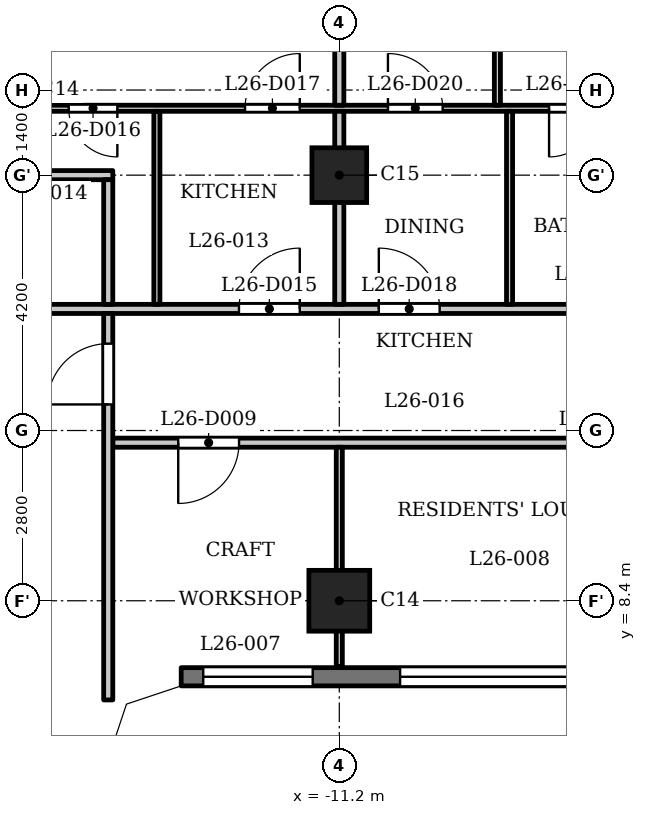
"""IFC4 building model, lengths in metres.
Left out: names, types, materials, properties, quantities, classifications, styles, units other than length and angle.
Written with IfcOpenShell. Run it as: python <this file> out.ifc"""

import sys

from ifc_helpers import new_model, si_unit, direction, frame, frame_2d, origin, origin_2d, place, context, subcontext, project, spatial, polyline, rectangle, outline, extrude, element, fill, save


model = new_model("IFC4")
c1 = context("Model", 3, precision=1e-05, world=origin(), true_north=direction((0.0, 1.0)))
c2 = subcontext(c1, "Body", "Model", "MODEL_VIEW")
j1 = project(units=[si_unit("LENGTHUNIT", "METRE"), si_unit("PLANEANGLEUNIT", "RADIAN")], contexts=[c1])
p1 = place(None, origin())
s1 = spatial("IfcSite", under=j1, at=p1, CompositionType="ELEMENT")
p2 = place(p1, origin())
s2 = spatial("IfcBuilding", under=s1, at=p2, CompositionType="ELEMENT")
p3 = place(p2, frame((0.0, 0.0, 104.3)))
s3 = spatial("IfcBuildingStorey", under=s2, at=p3, CompositionType="ELEMENT", Elevation=104.3)
p4 = place(p3, frame((-11.2, 8.4, 0.0), z_axis=(0.0, 0.0, 1.0), x_axis=(1.0, 0.0, 0.0)))
e1 = element("IfcColumn", 1, at=p4, inside=s3, PredefinedType="COLUMN", context=c2, shape_type="SweptSolid", body=[
    extrude(rectangle(XDim=1.0, YDim=1.0, at=origin_2d()), origin(), (0.0, 0.0, 1.0), 3.5),
])
p5 = place(p3, frame((-11.2, 15.4, 0.0), z_axis=(0.0, 0.0, 1.0), x_axis=(1.0, 0.0, 0.0)))
e2 = element("IfcColumn", 2, at=p5, inside=s3, PredefinedType="COLUMN", context=c2, shape_type="SweptSolid", body=[
    extrude(rectangle(XDim=0.9, YDim=0.9, at=origin_2d()), origin(), (0.0, 0.0, 1.0), 3.5),
])
p6 = place(p3, frame((-13.8, 7.15, 0.0), z_axis=(0.0, 0.0, 1.0), x_axis=(1.0, 0.0, 0.0)))
e3 = element("IfcWall", 3, at=p6, inside=s3, PredefinedType="SOLIDWALL", context=c2, shape_type="SweptSolid", body=[
    extrude(rectangle(XDim=27.6, YDim=0.3, at=frame_2d((13.8, 0.0))), origin(), (0.0, 0.0, 1.0), 3.2),
])
p7 = place(p6, frame((0.363, 0.0, 0.9)))
e4 = element("IfcOpeningElement", 4, at=p7, cuts=e3, PredefinedType="OPENING", context=c2, shape_type="SweptSolid", body=[
    extrude(rectangle(XDim=1.8, YDim=1.25, at=frame_2d((0.9, 0.625))), frame((0.0, 0.16, 0.0), z_axis=(0.0, -1.0, 0.0), x_axis=(1.0, 0.0, 0.0)), (0.0, 0.0, 1.0), 0.32),
])
p8 = place(p6, frame((3.6, 0.0, 1.2)))
e5 = element("IfcOpeningElement", 5, at=p8, cuts=e3, PredefinedType="OPENING", context=c2, shape_type="SweptSolid", body=[
    extrude(rectangle(XDim=3.6, YDim=0.95, at=frame_2d((1.8, 0.475))), frame((0.0, 0.16, 0.0), z_axis=(0.0, -1.0, 0.0), x_axis=(1.0, 0.0, 0.0)), (0.0, 0.0, 1.0), 0.32),
])
p9 = place(p6, frame((9.2, 0.0, 1.2)))
e6 = element("IfcOpeningElement", 6, at=p9, cuts=e3, PredefinedType="OPENING", context=c2, shape_type="SweptSolid", body=[
    extrude(rectangle(XDim=3.6, YDim=0.95, at=frame_2d((1.8, 0.475))), frame((0.0, 0.16, 0.0), z_axis=(0.0, -1.0, 0.0), x_axis=(1.0, 0.0, 0.0)), (0.0, 0.0, 1.0), 0.32),
])
p10 = place(p6, frame((14.8, 0.0, 1.2)))
e7 = element("IfcOpeningElement", 7, at=p10, cuts=e3, PredefinedType="OPENING", context=c2, shape_type="SweptSolid", body=[
    extrude(rectangle(XDim=3.6, YDim=0.95, at=frame_2d((1.8, 0.475))), frame((0.0, 0.16, 0.0), z_axis=(0.0, -1.0, 0.0), x_axis=(1.0, 0.0, 0.0)), (0.0, 0.0, 1.0), 0.32),
])
p11 = place(p6, frame((20.4, 0.0, 1.2)))
e8 = element("IfcOpeningElement", 8, at=p11, cuts=e3, PredefinedType="OPENING", context=c2, shape_type="SweptSolid", body=[
    extrude(rectangle(XDim=3.6, YDim=0.95, at=frame_2d((1.8, 0.475))), frame((0.0, 0.16, 0.0), z_axis=(0.0, -1.0, 0.0), x_axis=(1.0, 0.0, 0.0)), (0.0, 0.0, 1.0), 0.32),
])
p12 = place(p6, frame((25.438, 0.0, 0.9)))
e9 = element("IfcOpeningElement", 9, at=p12, cuts=e3, PredefinedType="OPENING", context=c2, shape_type="SweptSolid", body=[
    extrude(rectangle(XDim=1.8, YDim=1.25, at=frame_2d((0.9, 0.625))), frame((0.0, 0.16, 0.0), z_axis=(0.0, -1.0, 0.0), x_axis=(1.0, 0.0, 0.0)), (0.0, 0.0, 1.0), 0.32),
])
p13 = place(p3, frame((-14.925, 11.0, 0.0), z_axis=(0.0, 0.0, 1.0), x_axis=(1.0, 0.0, 0.0)))
e10 = element("IfcWall", 10, at=p13, inside=s3, PredefinedType="PARTITIONING", context=c2, shape_type="SweptSolid", body=[
    extrude(rectangle(XDim=29.85, YDim=0.15, at=frame_2d((14.925, 0.0))), origin(), (0.0, 0.0, 1.0), 3.2),
])
p14 = place(p13, frame((1.076, 0.0, 0.0)))
e11 = element("IfcOpeningElement", 11, at=p14, cuts=e10, PredefinedType="OPENING", context=c2, shape_type="SweptSolid", body=[
    extrude(rectangle(XDim=1.0, YDim=2.1, at=frame_2d((0.5, 1.05))), frame((0.0, 0.085, 0.0), z_axis=(0.0, -1.0, 0.0), x_axis=(1.0, 0.0, 0.0)), (0.0, 0.0, 1.0), 0.17),
])
p15 = place(p13, frame((7.625, 0.0, 0.0)))
e12 = element("IfcOpeningElement", 12, at=p15, cuts=e10, PredefinedType="OPENING", context=c2, shape_type="SweptSolid", body=[
    extrude(rectangle(XDim=1.0, YDim=2.1, at=frame_2d((0.5, 1.05))), frame((0.0, 0.085, 0.0), z_axis=(0.0, -1.0, 0.0), x_axis=(1.0, 0.0, 0.0)), (0.0, 0.0, 1.0), 0.17),
])
p16 = place(p13, frame((9.975, 0.0, 0.0)))
e13 = element("IfcOpeningElement", 13, at=p16, cuts=e10, PredefinedType="OPENING", context=c2, shape_type="SweptSolid", body=[
    extrude(rectangle(XDim=1.0, YDim=2.1, at=frame_2d((0.5, 1.05))), frame((0.0, 0.085, 0.0), z_axis=(0.0, -1.0, 0.0), x_axis=(1.0, 0.0, 0.0)), (0.0, 0.0, 1.0), 0.17),
])
p17 = place(p13, frame((18.825, 0.0, 0.0)))
e14 = element("IfcOpeningElement", 14, at=p17, cuts=e10, PredefinedType="OPENING", context=c2, shape_type="SweptSolid", body=[
    extrude(rectangle(XDim=1.0, YDim=2.1, at=frame_2d((0.5, 1.05))), frame((0.0, 0.085, 0.0), z_axis=(0.0, -1.0, 0.0), x_axis=(1.0, 0.0, 0.0)), (0.0, 0.0, 1.0), 0.17),
])
p18 = place(p13, frame((21.175, 0.0, 0.0)))
e15 = element("IfcOpeningElement", 15, at=p18, cuts=e10, PredefinedType="OPENING", context=c2, shape_type="SweptSolid", body=[
    extrude(rectangle(XDim=1.0, YDim=2.1, at=frame_2d((0.5, 1.05))), frame((0.0, 0.085, 0.0), z_axis=(0.0, -1.0, 0.0), x_axis=(1.0, 0.0, 0.0)), (0.0, 0.0, 1.0), 0.17),
])
p19 = place(p13, frame((27.775, 0.0, 0.0)))
e16 = element("IfcOpeningElement", 16, at=p19, cuts=e10, PredefinedType="OPENING", context=c2, shape_type="SweptSolid", body=[
    extrude(rectangle(XDim=1.0, YDim=2.1, at=frame_2d((0.5, 1.05))), frame((0.0, 0.085, 0.0), z_axis=(0.0, -1.0, 0.0), x_axis=(1.0, 0.0, 0.0)), (0.0, 0.0, 1.0), 0.17),
])
p20 = place(p3, frame((-17.4, 13.2, 0.0), z_axis=(0.0, 0.0, 1.0), x_axis=(1.0, 0.0, 0.0)))
e17 = element("IfcWall", 17, at=p20, inside=s3, PredefinedType="PARTITIONING", context=c2, shape_type="SweptSolid", body=[
    extrude(rectangle(XDim=34.8, YDim=0.15, at=frame_2d((17.4, 0.0))), origin(), (0.0, 0.0, 1.0), 3.2),
])
p21 = place(p20, frame((0.25, 0.0, 0.0)))
e18 = element("IfcOpeningElement", 18, at=p21, cuts=e17, PredefinedType="OPENING", context=c2, shape_type="SweptSolid", body=[
    extrude(rectangle(XDim=1.0, YDim=2.1, at=frame_2d((0.5, 1.05))), frame((0.0, 0.085, 0.0), z_axis=(0.0, -1.0, 0.0), x_axis=(1.0, 0.0, 0.0)), (0.0, 0.0, 1.0), 0.17),
])
p22 = place(p20, frame((33.65, 0.0, 0.0)))
e19 = element("IfcOpeningElement", 19, at=p22, cuts=e17, PredefinedType="OPENING", context=c2, shape_type="SweptSolid", body=[
    extrude(rectangle(XDim=1.0, YDim=2.1, at=frame_2d((0.5, 1.05))), frame((0.0, 0.085, 0.0), z_axis=(0.0, -1.0, 0.0), x_axis=(1.0, 0.0, 0.0)), (0.0, 0.0, 1.0), 0.17),
])
p23 = place(p20, frame((4.55, 0.0, 0.0)))
e20 = element("IfcOpeningElement", 20, at=p23, cuts=e17, PredefinedType="OPENING", context=c2, shape_type="SweptSolid", body=[
    extrude(rectangle(XDim=1.0, YDim=2.1, at=frame_2d((0.5, 1.05))), frame((0.0, 0.085, 0.0), z_axis=(0.0, -1.0, 0.0), x_axis=(1.0, 0.0, 0.0)), (0.0, 0.0, 1.0), 0.17),
])
p24 = place(p20, frame((6.85, 0.0, 0.0)))
e21 = element("IfcOpeningElement", 21, at=p24, cuts=e17, PredefinedType="OPENING", context=c2, shape_type="SweptSolid", body=[
    extrude(rectangle(XDim=1.0, YDim=2.1, at=frame_2d((0.5, 1.05))), frame((0.0, 0.085, 0.0), z_axis=(0.0, -1.0, 0.0), x_axis=(1.0, 0.0, 0.0)), (0.0, 0.0, 1.0), 0.17),
])
p25 = place(p20, frame((12.5, 0.0, 0.0)))
e22 = element("IfcOpeningElement", 22, at=p25, cuts=e17, PredefinedType="OPENING", context=c2, shape_type="SweptSolid", body=[
    extrude(rectangle(XDim=1.0, YDim=2.1, at=frame_2d((0.5, 1.05))), frame((0.0, 0.085, 0.0), z_axis=(0.0, -1.0, 0.0), x_axis=(1.0, 0.0, 0.0)), (0.0, 0.0, 1.0), 0.17),
])
p26 = place(p20, frame((25.7, 0.0, 0.0)))
e23 = element("IfcOpeningElement", 23, at=p26, cuts=e17, PredefinedType="OPENING", context=c2, shape_type="SweptSolid", body=[
    extrude(rectangle(XDim=1.0, YDim=2.1, at=frame_2d((0.5, 1.05))), frame((0.0, 0.085, 0.0), z_axis=(0.0, -1.0, 0.0), x_axis=(1.0, 0.0, 0.0)), (0.0, 0.0, 1.0), 0.17),
])
p27 = place(p20, frame((29.75, 0.0, 0.0)))
e24 = element("IfcOpeningElement", 24, at=p27, cuts=e17, PredefinedType="OPENING", context=c2, shape_type="SweptSolid", body=[
    extrude(rectangle(XDim=1.0, YDim=2.1, at=frame_2d((0.5, 1.05))), frame((0.0, 0.085, 0.0), z_axis=(0.0, -1.0, 0.0), x_axis=(1.0, 0.0, 0.0)), (0.0, 0.0, 1.0), 0.17),
])
p28 = place(p3, frame((-27.484, 15.4, 0.0), z_axis=(0.0, 0.0, 1.0), x_axis=(1.0, 0.0, 0.0)))
e25 = element("IfcWall", 25, at=p28, inside=s3, PredefinedType="PARTITIONING", context=c2, shape_type="SweptSolid", body=[
    extrude(rectangle(XDim=12.559, YDim=0.15, at=frame_2d((6.279, 0.0))), origin(), (0.0, 0.0, 1.0), 3.2),
])
p29 = place(p28, frame((9.034, 0.0, 0.0)))
e26 = element("IfcOpeningElement", 26, at=p29, cuts=e25, PredefinedType="OPENING", context=c2, shape_type="SweptSolid", body=[
    extrude(rectangle(XDim=1.0, YDim=2.1, at=frame_2d((0.5, 1.05))), frame((0.0, 0.085, 0.0), z_axis=(0.0, -1.0, 0.0), x_axis=(1.0, 0.0, 0.0)), (0.0, 0.0, 1.0), 0.17),
])
p30 = place(p3, frame((-16.725, 16.5, 0.0), z_axis=(0.0, 0.0, 1.0), x_axis=(1.0, 0.0, 0.0)))
e27 = element("IfcWall", 27, at=p30, inside=s3, PredefinedType="PARTITIONING", context=c2, shape_type="SweptSolid", body=[
    extrude(rectangle(XDim=33.45, YDim=0.1, at=frame_2d((16.725, 0.0))), origin(), (0.0, 0.0, 1.0), 3.2),
])
p31 = place(p30, frame((1.075, 0.0, 0.0)))
e28 = element("IfcOpeningElement", 28, at=p31, cuts=e27, PredefinedType="OPENING", context=c2, shape_type="SweptSolid", body=[
    extrude(rectangle(XDim=0.8, YDim=2.1, at=frame_2d((0.4, 1.05))), frame((0.0, 0.06, 0.0), z_axis=(0.0, -1.0, 0.0), x_axis=(1.0, 0.0, 0.0)), (0.0, 0.0, 1.0), 0.12),
])
p32 = place(p30, frame((3.975, 0.0, 0.0)))
e29 = element("IfcOpeningElement", 29, at=p32, cuts=e27, PredefinedType="OPENING", context=c2, shape_type="SweptSolid", body=[
    extrude(rectangle(XDim=0.9, YDim=2.1, at=frame_2d((0.45, 1.05))), frame((0.0, 0.06, 0.0), z_axis=(0.0, -1.0, 0.0), x_axis=(1.0, 0.0, 0.0)), (0.0, 0.0, 1.0), 0.12),
])
p33 = place(p30, frame((8.975, 0.0, 0.0)))
e30 = element("IfcOpeningElement", 30, at=p33, cuts=e27, PredefinedType="OPENING", context=c2, shape_type="SweptSolid", body=[
    extrude(rectangle(XDim=0.8, YDim=2.1, at=frame_2d((0.4, 1.05))), frame((0.0, 0.06, 0.0), z_axis=(0.0, -1.0, 0.0), x_axis=(1.0, 0.0, 0.0)), (0.0, 0.0, 1.0), 0.12),
])
p34 = place(p30, frame((6.325, 0.0, 0.0)))
e31 = element("IfcOpeningElement", 31, at=p34, cuts=e27, PredefinedType="OPENING", context=c2, shape_type="SweptSolid", body=[
    extrude(rectangle(XDim=0.9, YDim=2.1, at=frame_2d((0.45, 1.05))), frame((0.0, 0.06, 0.0), z_axis=(0.0, -1.0, 0.0), x_axis=(1.0, 0.0, 0.0)), (0.0, 0.0, 1.0), 0.12),
])
p35 = place(p30, frame((20.725, 0.0, 0.0)))
e32 = element("IfcOpeningElement", 32, at=p35, cuts=e27, PredefinedType="OPENING", context=c2, shape_type="SweptSolid", body=[
    extrude(rectangle(XDim=0.8, YDim=2.1, at=frame_2d((0.4, 1.05))), frame((0.0, 0.06, 0.0), z_axis=(0.0, -1.0, 0.0), x_axis=(1.0, 0.0, 0.0)), (0.0, 0.0, 1.0), 0.12),
])
p36 = place(p30, frame((17.775, 0.0, 0.0)))
e33 = element("IfcOpeningElement", 33, at=p36, cuts=e27, PredefinedType="OPENING", context=c2, shape_type="SweptSolid", body=[
    extrude(rectangle(XDim=0.9, YDim=2.1, at=frame_2d((0.45, 1.05))), frame((0.0, 0.06, 0.0), z_axis=(0.0, -1.0, 0.0), x_axis=(1.0, 0.0, 0.0)), (0.0, 0.0, 1.0), 0.12),
])
p37 = place(p30, frame((11.825, 0.0, 0.0)))
e34 = element("IfcOpeningElement", 34, at=p37, cuts=e27, PredefinedType="OPENING", context=c2, shape_type="SweptSolid", body=[
    extrude(rectangle(XDim=0.9, YDim=2.1, at=frame_2d((0.45, 1.05))), frame((0.0, 0.06, 0.0), z_axis=(0.0, -1.0, 0.0), x_axis=(1.0, 0.0, 0.0)), (0.0, 0.0, 1.0), 0.12),
])
p38 = place(p30, frame((15.175, 0.0, 0.0)))
e35 = element("IfcOpeningElement", 35, at=p38, cuts=e27, PredefinedType="OPENING", context=c2, shape_type="SweptSolid", body=[
    extrude(rectangle(XDim=0.9, YDim=2.1, at=frame_2d((0.45, 1.05))), frame((0.0, 0.06, 0.0), z_axis=(0.0, -1.0, 0.0), x_axis=(1.0, 0.0, 0.0)), (0.0, 0.0, 1.0), 0.12),
])
p39 = place(p30, frame((22.975, 0.0, 0.0)))
e36 = element("IfcOpeningElement", 36, at=p39, cuts=e27, PredefinedType="OPENING", context=c2, shape_type="SweptSolid", body=[
    extrude(rectangle(XDim=0.8, YDim=2.1, at=frame_2d((0.4, 1.05))), frame((0.0, 0.06, 0.0), z_axis=(0.0, -1.0, 0.0), x_axis=(1.0, 0.0, 0.0)), (0.0, 0.0, 1.0), 0.12),
])
p40 = place(p30, frame((24.875, 0.0, 0.0)))
e37 = element("IfcOpeningElement", 37, at=p40, cuts=e27, PredefinedType="OPENING", context=c2, shape_type="SweptSolid", body=[
    extrude(rectangle(XDim=0.9, YDim=2.1, at=frame_2d((0.45, 1.05))), frame((0.0, 0.06, 0.0), z_axis=(0.0, -1.0, 0.0), x_axis=(1.0, 0.0, 0.0)), (0.0, 0.0, 1.0), 0.12),
])
p41 = place(p30, frame((32.075, 0.0, 0.0)))
e38 = element("IfcOpeningElement", 38, at=p41, cuts=e27, PredefinedType="OPENING", context=c2, shape_type="SweptSolid", body=[
    extrude(rectangle(XDim=0.8, YDim=2.1, at=frame_2d((0.4, 1.05))), frame((0.0, 0.06, 0.0), z_axis=(0.0, -1.0, 0.0), x_axis=(1.0, 0.0, 0.0)), (0.0, 0.0, 1.0), 0.12),
])
p42 = place(p30, frame((29.175, 0.0, 0.0)))
e39 = element("IfcOpeningElement", 39, at=p42, cuts=e27, PredefinedType="OPENING", context=c2, shape_type="SweptSolid", body=[
    extrude(rectangle(XDim=0.9, YDim=2.1, at=frame_2d((0.45, 1.05))), frame((0.0, 0.06, 0.0), z_axis=(0.0, -1.0, 0.0), x_axis=(1.0, 0.0, 0.0)), (0.0, 0.0, 1.0), 0.12),
])
p43 = place(p3, frame((-15.0, 6.769, 0.0), z_axis=(0.0, 0.0, 1.0), x_axis=(0.0, 1.0, 0.0)))
e40 = element("IfcWall", 40, at=p43, inside=s3, PredefinedType="PARTITIONING", context=c2, shape_type="SweptSolid", body=[
    extrude(rectangle(XDim=6.356, YDim=0.15, at=frame_2d((3.178, 0.0))), origin(), (0.0, 0.0, 1.0), 3.2),
])
p44 = place(p43, frame((4.86, 0.0, 0.0)))
e41 = element("IfcOpeningElement", 41, at=p44, cuts=e40, PredefinedType="OPENING", context=c2, shape_type="SweptSolid", body=[
    extrude(rectangle(XDim=1.0, YDim=2.1, at=frame_2d((0.5, 1.05))), frame((0.0, 0.085, 0.0), z_axis=(0.0, -1.0, 0.0), x_axis=(1.0, 0.0, 0.0)), (0.0, 0.0, 1.0), 0.17),
])
p45 = place(p3, frame((-15.0, 13.275, 0.0), z_axis=(0.0, 0.0, 1.0), x_axis=(0.0, 1.0, 0.0)))
e42 = element("IfcWall", 42, at=p45, inside=s3, PredefinedType="PARTITIONING", context=c2, shape_type="SweptSolid", body=[
    extrude(rectangle(XDim=2.05, YDim=0.15, at=frame_2d((1.025, 0.0))), origin(), (0.0, 0.0, 1.0), 3.2),
])
p46 = place(p3, frame((-14.2, 13.275, 0.0), z_axis=(0.0, 0.0, 1.0), x_axis=(0.0, 1.0, 0.0)))
e43 = element("IfcWall", 43, at=p46, inside=s3, PredefinedType="PARTITIONING", context=c2, shape_type="SweptSolid", body=[
    extrude(rectangle(XDim=3.175, YDim=0.1, at=frame_2d((1.587, 0.0))), origin(), (0.0, 0.0, 1.0), 3.2),
])
p47 = place(p3, frame((-11.2, 7.32, 0.0), z_axis=(0.0, 0.0, 1.0), x_axis=(0.0, 1.0, 0.0)))
e44 = element("IfcWall", 44, at=p47, inside=s3, PredefinedType="PARTITIONING", context=c2, shape_type="SweptSolid", body=[
    extrude(rectangle(XDim=3.605, YDim=0.1, at=frame_2d((1.802, 0.0))), origin(), (0.0, 0.0, 1.0), 3.2),
])
p48 = place(p3, frame((-11.2, 13.275, 0.0), z_axis=(0.0, 0.0, 1.0), x_axis=(0.0, 1.0, 0.0)))
e45 = element("IfcWall", 45, at=p48, inside=s3, PredefinedType="PARTITIONING", context=c2, shape_type="SweptSolid", body=[
    extrude(rectangle(XDim=3.175, YDim=0.15, at=frame_2d((1.587, 0.0))), origin(), (0.0, 0.0, 1.0), 3.2),
])
p49 = place(p3, frame((-11.2, 16.55, 0.0), z_axis=(0.0, 0.0, 1.0), x_axis=(0.0, 1.0, 0.0)))
e46 = element("IfcWall", 46, at=p49, inside=s3, PredefinedType="PARTITIONING", context=c2, shape_type="SweptSolid", body=[
    extrude(rectangle(XDim=6.48, YDim=0.15, at=frame_2d((3.24, 0.0))), origin(), (0.0, 0.0, 1.0), 3.2),
])
p50 = place(p3, frame((-8.6, 16.55, 0.0), z_axis=(0.0, 0.0, 1.0), x_axis=(0.0, 1.0, 0.0)))
e47 = element("IfcWall", 47, at=p50, inside=s3, PredefinedType="PARTITIONING", context=c2, shape_type="SweptSolid", body=[
    extrude(rectangle(XDim=5.53, YDim=0.1, at=frame_2d((2.765, 0.0))), origin(), (0.0, 0.0, 1.0), 3.2),
])
p51 = place(p50, frame((1.35, 0.0, 0.0)))
e48 = element("IfcOpeningElement", 48, at=p51, cuts=e47, PredefinedType="OPENING", context=c2, shape_type="SweptSolid", body=[
    extrude(rectangle(XDim=0.9, YDim=2.1, at=frame_2d((0.45, 1.05))), frame((0.0, 0.06, 0.0), z_axis=(0.0, -1.0, 0.0), x_axis=(1.0, 0.0, 0.0)), (0.0, 0.0, 1.0), 0.12),
])
p52 = place(p3, frame((-8.4, 13.275, 0.0), z_axis=(0.0, 0.0, 1.0), x_axis=(0.0, 1.0, 0.0)))
e49 = element("IfcWall", 49, at=p52, inside=s3, PredefinedType="PARTITIONING", context=c2, shape_type="SweptSolid", body=[
    extrude(rectangle(XDim=3.175, YDim=0.1, at=frame_2d((1.587, 0.0))), origin(), (0.0, 0.0, 1.0), 3.2),
])
p53 = place(p3, origin())
e50 = element("IfcWall", 50, at=p53, inside=s3, PredefinedType="SOLIDWALL", context=c2, shape_type="SweptSolid", body=[
    extrude(outline(polyline([(-13.849, 7.3), (-14.937, 6.937), (-15.3, 5.849), (-15.3, 5.8), (-15.0, 5.8), (-14.7, 6.7), (-13.8, 7.0), (-13.8, 7.3), (-13.849, 7.3)])), origin(), (0.0, 0.0, 1.0), 3.2),
])
p54 = place(p44, origin())
e51 = element("IfcDoor", 51, at=p54, inside=s3, OperationType="SINGLE_SWING_RIGHT", PredefinedType="DOOR", context=c2, shape_type="SweptSolid", body=[
    extrude(rectangle(XDim=1.0, YDim=2.1, at=frame_2d((0.5, 1.05))), frame((0.0, 0.025, 0.0), z_axis=(0.0, -1.0, 0.0), x_axis=(1.0, 0.0, 0.0)), (0.0, 0.0, 1.0), 0.05),
])
fill(e41, e51)
p55 = place(p14, origin())
e52 = element("IfcDoor", 52, at=p55, inside=s3, OperationType="SINGLE_SWING_LEFT", PredefinedType="DOOR", context=c2, shape_type="SweptSolid", body=[
    extrude(rectangle(XDim=1.0, YDim=2.1, at=frame_2d((0.5, 1.05))), frame((0.0, 0.025, 0.0), z_axis=(0.0, -1.0, 0.0), x_axis=(1.0, 0.0, 0.0)), (0.0, 0.0, 1.0), 0.05),
])
fill(e11, e52)
p56 = place(p23, origin())
e53 = element("IfcDoor", 53, at=p56, inside=s3, OperationType="SINGLE_SWING_LEFT", PredefinedType="DOOR", context=c2, shape_type="SweptSolid", body=[
    extrude(rectangle(XDim=1.0, YDim=2.1, at=frame_2d((0.5, 1.05))), frame((0.0, 0.025, 0.0), z_axis=(0.0, -1.0, 0.0), x_axis=(1.0, 0.0, 0.0)), (0.0, 0.0, 1.0), 0.05),
])
fill(e20, e53)
p57 = place(p31, origin())
e54 = element("IfcDoor", 54, at=p57, inside=s3, OperationType="SINGLE_SWING_RIGHT", PredefinedType="DOOR", context=c2, shape_type="SweptSolid", body=[
    extrude(rectangle(XDim=0.8, YDim=2.1, at=frame_2d((0.4, 1.05))), frame((0.0, 0.025, 0.0), z_axis=(0.0, -1.0, 0.0), x_axis=(1.0, 0.0, 0.0)), (0.0, 0.0, 1.0), 0.05),
])
fill(e28, e54)
p58 = place(p32, origin())
e55 = element("IfcDoor", 55, at=p58, inside=s3, OperationType="SINGLE_SWING_LEFT", PredefinedType="DOOR", context=c2, shape_type="SweptSolid", body=[
    extrude(rectangle(XDim=0.9, YDim=2.1, at=frame_2d((0.45, 1.05))), frame((0.0, 0.025, 0.0), z_axis=(0.0, -1.0, 0.0), x_axis=(1.0, 0.0, 0.0)), (0.0, 0.0, 1.0), 0.05),
])
fill(e29, e55)
p59 = place(p24, origin())
e56 = element("IfcDoor", 56, at=p59, inside=s3, OperationType="SINGLE_SWING_RIGHT", PredefinedType="DOOR", context=c2, shape_type="SweptSolid", body=[
    extrude(rectangle(XDim=1.0, YDim=2.1, at=frame_2d((0.5, 1.05))), frame((0.0, 0.025, 0.0), z_axis=(0.0, -1.0, 0.0), x_axis=(1.0, 0.0, 0.0)), (0.0, 0.0, 1.0), 0.05),
])
fill(e21, e56)
p60 = place(p33, origin())
e57 = element("IfcDoor", 57, at=p60, inside=s3, OperationType="SINGLE_SWING_LEFT", PredefinedType="DOOR", context=c2, shape_type="SweptSolid", body=[
    extrude(rectangle(XDim=0.8, YDim=2.1, at=frame_2d((0.4, 1.05))), frame((0.0, 0.025, 0.0), z_axis=(0.0, -1.0, 0.0), x_axis=(1.0, 0.0, 0.0)), (0.0, 0.0, 1.0), 0.05),
])
fill(e30, e57)
p61 = place(p34, origin())
e58 = element("IfcDoor", 58, at=p61, inside=s3, OperationType="SINGLE_SWING_RIGHT", PredefinedType="DOOR", context=c2, shape_type="SweptSolid", body=[
    extrude(rectangle(XDim=0.9, YDim=2.1, at=frame_2d((0.45, 1.05))), frame((0.0, 0.025, 0.0), z_axis=(0.0, -1.0, 0.0), x_axis=(1.0, 0.0, 0.0)), (0.0, 0.0, 1.0), 0.05),
])
fill(e31, e58)
p62 = place(p7, origin())
e59 = element("IfcWindow", 59, at=p62, inside=s3, PartitioningType="SINGLE_PANEL", PredefinedType="WINDOW", context=c2, shape_type="SweptSolid", body=[
    extrude(rectangle(XDim=1.8, YDim=1.25, at=frame_2d((0.9, 0.625))), frame((0.0, 0.03, 0.0), z_axis=(0.0, -1.0, 0.0), x_axis=(1.0, 0.0, 0.0)), (0.0, 0.0, 1.0), 0.06),
])
fill(e4, e59)
p63 = place(p8, origin())
e60 = element("IfcWindow", 60, at=p63, inside=s3, PartitioningType="SINGLE_PANEL", PredefinedType="WINDOW", context=c2, shape_type="SweptSolid", body=[
    extrude(rectangle(XDim=3.6, YDim=0.95, at=frame_2d((1.8, 0.475))), frame((0.0, 0.03, 0.0), z_axis=(0.0, -1.0, 0.0), x_axis=(1.0, 0.0, 0.0)), (0.0, 0.0, 1.0), 0.06),
])
fill(e5, e60)
save(model, sys.argv[1])
